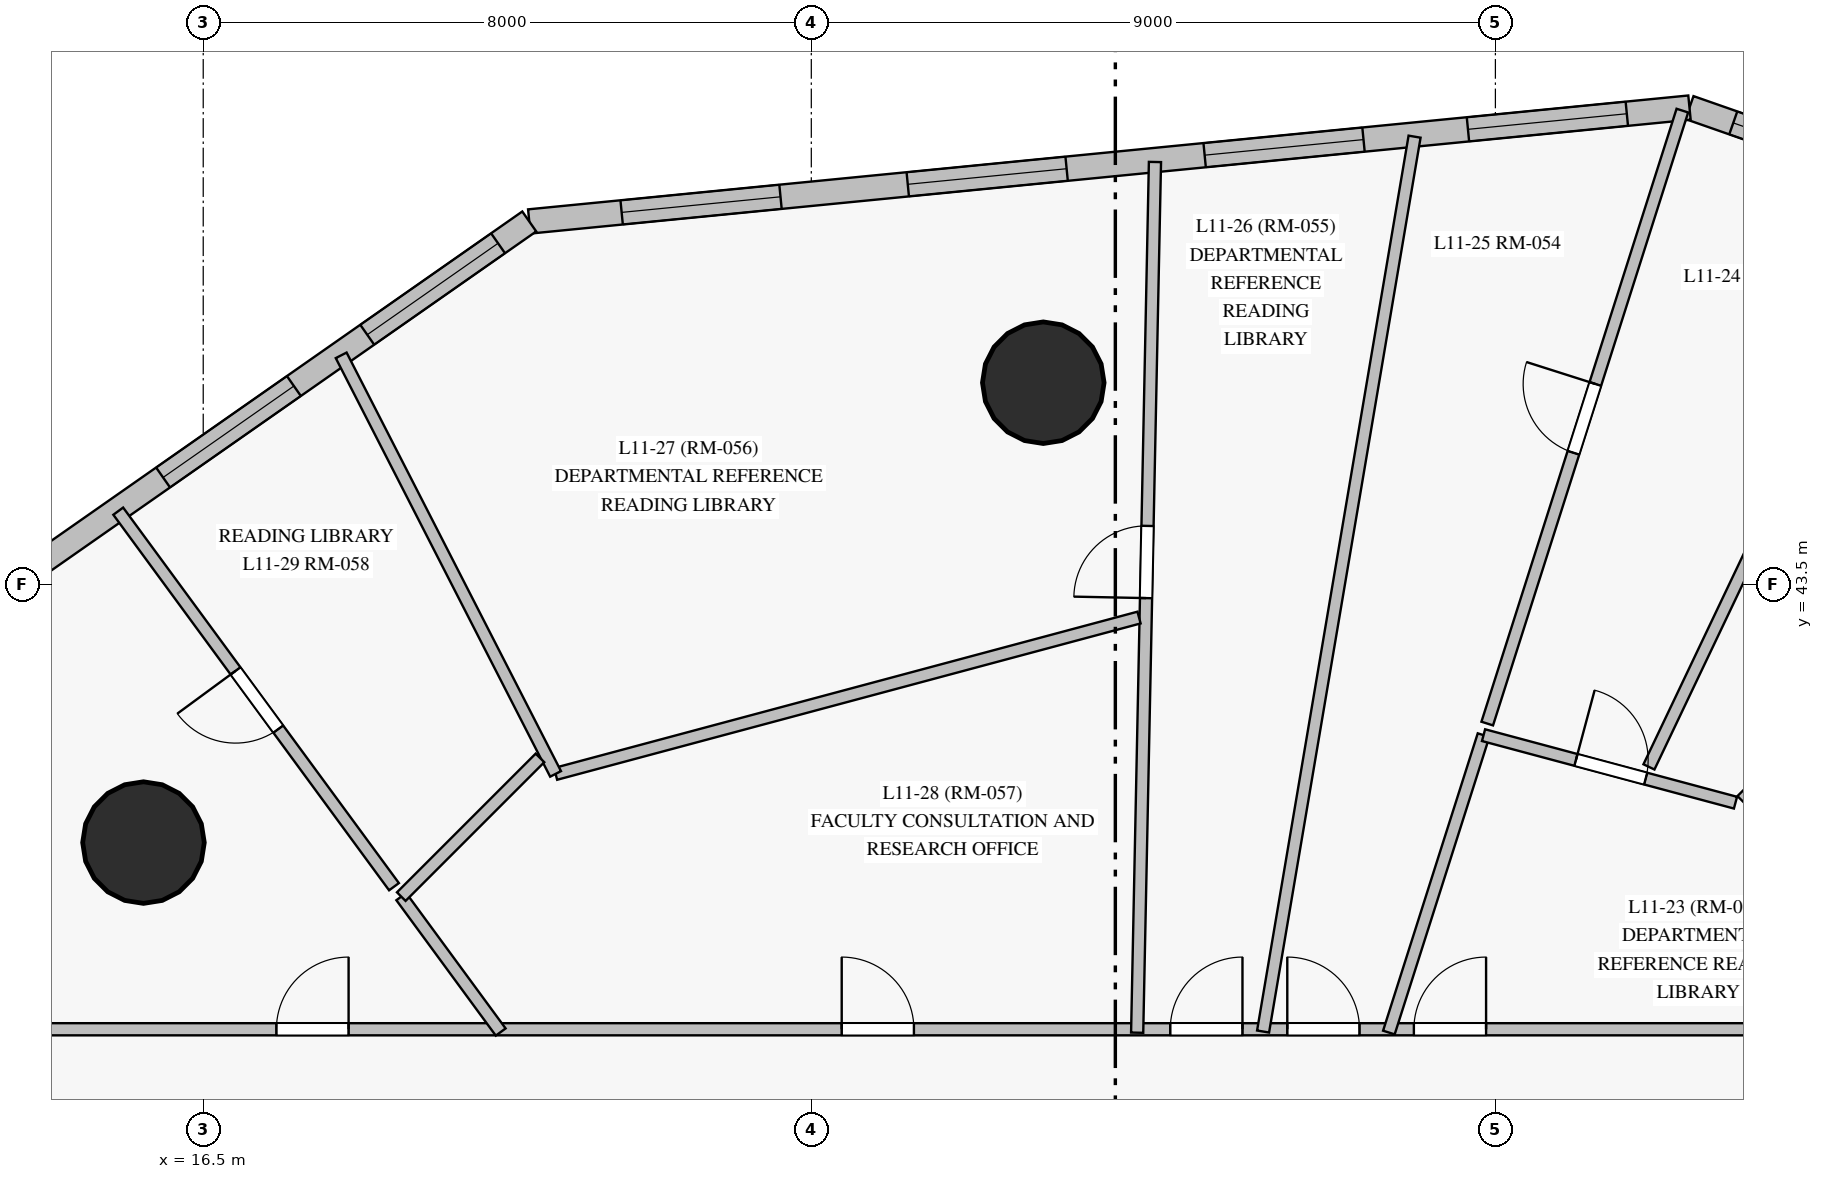
"""IFC4 building model, lengths in metres.
Left out: names, types, materials, properties, quantities, classifications, styles, units other than length and angle.
Written with IfcOpenShell. Run it as: python <this file> out.ifc"""

import sys

from ifc_helpers import new_model, si_unit, direction, frame, frame_2d, origin, origin_with_axes, origin_2d, place, context, subcontext, project, spatial, rectangle, circle, extrude, source, transform, mapped, element, fill, save


model = new_model("IFC4")
c1 = context("Model", 3, precision=1e-05, world=origin(), true_north=direction((0.0, 1.0)))
c2 = subcontext(c1, "Body", "Model", "MODEL_VIEW")
j1 = project(units=[si_unit("LENGTHUNIT", "METRE"), si_unit("PLANEANGLEUNIT", "RADIAN")], contexts=[c1])
p1 = place(None, origin())
s1 = spatial("IfcSite", under=j1, at=p1, CompositionType="ELEMENT")
p2 = place(p1, origin())
s2 = spatial("IfcBuilding", under=s1, at=p2, CompositionType="ELEMENT")
p3 = place(p2, frame((0.0, 0.0, 44.5)))
s3 = spatial("IfcBuildingStorey", under=s2, at=p3, CompositionType="ELEMENT", Elevation=44.5)
m1 = source(origin_with_axes(), c2, "Body", "SweptSolid", [
    extrude(circle(Radius=0.8, at=origin_2d()), origin(), (0.0, 0.0, 1.0), 3.6),
])
for number, where, z_axis, x_axis in (
    (1, (27.552, 46.156, 0.0), (0.0, 0.0, 1.0), (1.0, 0.0, 0.0)),
    (2, (15.714, 40.106, 0.0), (0.0, 0.0, 1.0), (1.0, 0.0, 0.0)),
):
    element("IfcColumn", number, at=place(p3, frame(where, z_axis=z_axis, x_axis=x_axis)), inside=s3, PredefinedType="COLUMN", context=c2, shape_type="MappedRepresentation", body=[
        mapped(m1, transform((0.0, 0.0, 0.0), scale=1.0)),
    ])
p4 = place(p3, frame((46.022, 46.29, 0.0), z_axis=(0.0, 0.0, 1.0), x_axis=(-0.943970038145, 0.330031160777, 0.0)))
e3 = element("IfcWall", 3, at=p4, inside=s3, PredefinedType="SOLIDWALL", context=c2, shape_type="SweptSolid", body=[
    extrude(rectangle(XDim=10.56, YDim=0.32, at=frame_2d((5.28, 0.0))), origin(), (0.0, 0.0, 1.0), 3.35),
])
p5 = place(p4, frame((0.576, 0.0, 0.85)))
e4 = element("IfcOpeningElement", 4, at=p5, cuts=e3, PredefinedType="OPENING", context=c2, shape_type="SweptSolid", body=[
    extrude(rectangle(XDim=1.5, YDim=1.85, at=frame_2d((0.75, 0.925))), frame((0.0, 0.17, 0.0), z_axis=(0.0, -1.0, 0.0), x_axis=(1.0, 0.0, 0.0)), (0.0, 0.0, 1.0), 0.34),
])
p6 = place(p4, frame((3.896, 0.0, 0.85)))
e5 = element("IfcOpeningElement", 5, at=p6, cuts=e3, PredefinedType="OPENING", context=c2, shape_type="SweptSolid", body=[
    extrude(rectangle(XDim=2.1, YDim=1.95, at=frame_2d((1.05, 0.975))), frame((0.0, 0.17, 0.0), z_axis=(0.0, -1.0, 0.0), x_axis=(1.0, 0.0, 0.0)), (0.0, 0.0, 1.0), 0.34),
])
p7 = place(p4, frame((7.85, 0.0, 0.85)))
e6 = element("IfcOpeningElement", 6, at=p7, cuts=e3, PredefinedType="OPENING", context=c2, shape_type="SweptSolid", body=[
    extrude(rectangle(XDim=2.1, YDim=1.95, at=frame_2d((1.05, 0.975))), frame((0.0, 0.17, 0.0), z_axis=(0.0, -1.0, 0.0), x_axis=(1.0, 0.0, 0.0)), (0.0, 0.0, 1.0), 0.34),
])
p8 = place(p3, frame((36.053, 49.775, 0.0), z_axis=(0.0, 0.0, 1.0), x_axis=(-0.995220186706, -0.097656438461, 0.0)))
e7 = element("IfcWall", 7, at=p8, inside=s3, PredefinedType="SOLIDWALL", context=c2, shape_type="SweptSolid", body=[
    extrude(rectangle(XDim=15.337, YDim=0.32, at=frame_2d((7.669, 0.0))), origin(), (0.0, 0.0, 1.0), 3.35),
])
p9 = place(p8, frame((0.828, 0.0, 0.85)))
e8 = element("IfcOpeningElement", 8, at=p9, cuts=e7, PredefinedType="OPENING", context=c2, shape_type="SweptSolid", body=[
    extrude(rectangle(XDim=2.1, YDim=1.95, at=frame_2d((1.05, 0.975))), frame((0.0, 0.17, 0.0), z_axis=(0.0, -1.0, 0.0), x_axis=(1.0, 0.0, 0.0)), (0.0, 0.0, 1.0), 0.34),
])
p10 = place(p8, frame((4.309, 0.0, 0.85)))
e9 = element("IfcOpeningElement", 9, at=p10, cuts=e7, PredefinedType="OPENING", context=c2, shape_type="SweptSolid", body=[
    extrude(rectangle(XDim=2.1, YDim=1.95, at=frame_2d((1.05, 0.975))), frame((0.0, 0.17, 0.0), z_axis=(0.0, -1.0, 0.0), x_axis=(1.0, 0.0, 0.0)), (0.0, 0.0, 1.0), 0.34),
])
p11 = place(p8, frame((8.234, 0.0, 0.85)))
e10 = element("IfcOpeningElement", 10, at=p11, cuts=e7, PredefinedType="OPENING", context=c2, shape_type="SweptSolid", body=[
    extrude(rectangle(XDim=2.1, YDim=1.95, at=frame_2d((1.05, 0.975))), frame((0.0, 0.17, 0.0), z_axis=(0.0, -1.0, 0.0), x_axis=(1.0, 0.0, 0.0)), (0.0, 0.0, 1.0), 0.34),
])
p12 = place(p8, frame((12.016, 0.0, 0.85)))
e11 = element("IfcOpeningElement", 11, at=p12, cuts=e7, PredefinedType="OPENING", context=c2, shape_type="SweptSolid", body=[
    extrude(rectangle(XDim=2.1, YDim=1.95, at=frame_2d((1.05, 0.975))), frame((0.0, 0.17, 0.0), z_axis=(0.0, -1.0, 0.0), x_axis=(1.0, 0.0, 0.0)), (0.0, 0.0, 1.0), 0.34),
])
p13 = place(p3, frame((20.789, 48.278, 0.0), z_axis=(0.0, 0.0, 1.0), x_axis=(-0.819542780698, -0.573018001991, 0.0)))
e12 = element("IfcWall", 12, at=p13, inside=s3, PredefinedType="SOLIDWALL", context=c2, shape_type="SweptSolid", body=[
    extrude(rectangle(XDim=12.319, YDim=0.32, at=frame_2d((6.159, 0.0))), origin(), (0.0, 0.0, 1.0), 3.35),
])
p14 = place(p13, frame((0.501, 0.0, 0.85)))
e13 = element("IfcOpeningElement", 13, at=p14, cuts=e12, PredefinedType="OPENING", context=c2, shape_type="SweptSolid", body=[
    extrude(rectangle(XDim=2.1, YDim=1.95, at=frame_2d((1.05, 0.975))), frame((0.0, 0.17, 0.0), z_axis=(0.0, -1.0, 0.0), x_axis=(1.0, 0.0, 0.0)), (0.0, 0.0, 1.0), 0.34),
])
p15 = place(p13, frame((3.778, 0.0, 0.85)))
e14 = element("IfcOpeningElement", 14, at=p15, cuts=e12, PredefinedType="OPENING", context=c2, shape_type="SweptSolid", body=[
    extrude(rectangle(XDim=2.1, YDim=1.95, at=frame_2d((1.05, 0.975))), frame((0.0, 0.17, 0.0), z_axis=(0.0, -1.0, 0.0), x_axis=(1.0, 0.0, 0.0)), (0.0, 0.0, 1.0), 0.34),
])
p16 = place(p13, frame((8.387, 0.0, 0.85)))
e15 = element("IfcOpeningElement", 15, at=p16, cuts=e12, PredefinedType="OPENING", context=c2, shape_type="SweptSolid", body=[
    extrude(rectangle(XDim=2.1, YDim=1.95, at=frame_2d((1.05, 0.975))), frame((0.0, 0.17, 0.0), z_axis=(0.0, -1.0, 0.0), x_axis=(1.0, 0.0, 0.0)), (0.0, 0.0, 1.0), 0.34),
])
p17 = place(p3, frame((10.5, 37.65, 0.0), z_axis=(0.0, 0.0, 1.0), x_axis=(1.0, 0.0, 0.0)))
e16 = element("IfcWall", 16, at=p17, inside=s3, PredefinedType="PARTITIONING", context=c2, shape_type="SweptSolid", body=[
    extrude(rectangle(XDim=29.75, YDim=0.16, at=frame_2d((14.875, 0.0))), origin(), (0.0, 0.0, 1.0), 2.75),
])
p18 = place(p17, frame((21.927, 0.0, 0.0)))
e17 = element("IfcOpeningElement", 17, at=p18, cuts=e16, PredefinedType="OPENING", context=c2, shape_type="SweptSolid", body=[
    extrude(rectangle(XDim=0.95, YDim=2.15, at=frame_2d((0.475, 1.075))), frame((0.0, 0.09, 0.0), z_axis=(0.0, -1.0, 0.0), x_axis=(1.0, 0.0, 0.0)), (0.0, 0.0, 1.0), 0.18),
])
p19 = place(p17, frame((20.262, 0.0, 0.0)))
e18 = element("IfcOpeningElement", 18, at=p19, cuts=e16, PredefinedType="OPENING", context=c2, shape_type="SweptSolid", body=[
    extrude(rectangle(XDim=0.95, YDim=2.15, at=frame_2d((0.475, 1.075))), frame((0.0, 0.09, 0.0), z_axis=(0.0, -1.0, 0.0), x_axis=(1.0, 0.0, 0.0)), (0.0, 0.0, 1.0), 0.18),
])
p20 = place(p17, frame((18.722, 0.0, 0.0)))
e19 = element("IfcOpeningElement", 19, at=p20, cuts=e16, PredefinedType="OPENING", context=c2, shape_type="SweptSolid", body=[
    extrude(rectangle(XDim=0.95, YDim=2.15, at=frame_2d((0.475, 1.075))), frame((0.0, 0.09, 0.0), z_axis=(0.0, -1.0, 0.0), x_axis=(1.0, 0.0, 0.0)), (0.0, 0.0, 1.0), 0.18),
])
p21 = place(p17, frame((14.4, 0.0, 0.0)))
e20 = element("IfcOpeningElement", 20, at=p21, cuts=e16, PredefinedType="OPENING", context=c2, shape_type="SweptSolid", body=[
    extrude(rectangle(XDim=0.95, YDim=2.15, at=frame_2d((0.475, 1.075))), frame((0.0, 0.09, 0.0), z_axis=(0.0, -1.0, 0.0), x_axis=(1.0, 0.0, 0.0)), (0.0, 0.0, 1.0), 0.18),
])
p22 = place(p17, frame((6.962, 0.0, 0.0)))
e21 = element("IfcOpeningElement", 21, at=p22, cuts=e16, PredefinedType="OPENING", context=c2, shape_type="SweptSolid", body=[
    extrude(rectangle(XDim=0.95, YDim=2.15, at=frame_2d((0.475, 1.075))), frame((0.0, 0.09, 0.0), z_axis=(0.0, -1.0, 0.0), x_axis=(1.0, 0.0, 0.0)), (0.0, 0.0, 1.0), 0.18),
])
p23 = place(p3, frame((30.444, 37.62, 0.0), z_axis=(0.0, 0.0, 1.0), x_axis=(0.166928333603, 0.985969031684, 0.0)))
e22 = element("IfcWall", 22, at=p23, inside=s3, PredefinedType="PARTITIONING", context=c2, shape_type="SweptSolid", body=[
    extrude(rectangle(XDim=11.94, YDim=0.16, at=frame_2d((5.97, 0.0))), origin(), (0.0, 0.0, 1.0), 3.35),
])
p24 = place(p3, frame((28.787, 37.605, 0.0), z_axis=(0.0, 0.0, 1.0), x_axis=(0.020435212619, 0.99979117924, 0.0)))
e23 = element("IfcWall", 23, at=p24, inside=s3, PredefinedType="PARTITIONING", context=c2, shape_type="SweptSolid", body=[
    extrude(rectangle(XDim=11.457, YDim=0.16, at=frame_2d((5.729, 0.0))), origin(), (0.0, 0.0, 1.0), 3.35),
])
p25 = place(p24, frame((5.719, 0.0, 0.0)))
e24 = element("IfcOpeningElement", 24, at=p25, cuts=e23, PredefinedType="OPENING", context=c2, shape_type="SweptSolid", body=[
    extrude(rectangle(XDim=0.95, YDim=2.15, at=frame_2d((0.475, 1.075))), frame((0.0, 0.09, 0.0), z_axis=(0.0, -1.0, 0.0), x_axis=(1.0, 0.0, 0.0)), (0.0, 0.0, 1.0), 0.18),
])
p26 = place(p3, frame((33.393, 41.672, 0.0), z_axis=(0.0, 0.0, 1.0), x_axis=(0.303320350776, 0.952888642395, 0.0)))
e25 = element("IfcWall", 25, at=p26, inside=s3, PredefinedType="PARTITIONING", context=c2, shape_type="SweptSolid", body=[
    extrude(rectangle(XDim=8.463, YDim=0.16, at=frame_2d((4.231, 0.0))), origin(), (0.0, 0.0, 1.0), 3.35),
])
p27 = place(p26, frame((3.739, 0.0, 0.0)))
e26 = element("IfcOpeningElement", 26, at=p27, cuts=e25, PredefinedType="OPENING", context=c2, shape_type="SweptSolid", body=[
    extrude(rectangle(XDim=0.95, YDim=2.15, at=frame_2d((0.475, 1.075))), frame((0.0, 0.09, 0.0), z_axis=(0.0, -1.0, 0.0), x_axis=(1.0, 0.0, 0.0)), (0.0, 0.0, 1.0), 0.18),
])
p28 = place(p3, frame((35.52, 41.102, 0.0), z_axis=(0.0, 0.0, 1.0), x_axis=(0.429957308005, 0.902849219578, 0.0)))
e27 = element("IfcWall", 27, at=p28, inside=s3, PredefinedType="PARTITIONING", context=c2, shape_type="SweptSolid", body=[
    extrude(rectangle(XDim=8.387, YDim=0.16, at=frame_2d((4.194, 0.0))), origin(), (0.0, 0.0, 1.0), 3.35),
])
p29 = place(p3, frame((28.812, 43.066, 0.0), z_axis=(0.0, 0.0, 1.0), x_axis=(-0.965922681533, -0.258830781207, 0.0)))
e28 = element("IfcWall", 28, at=p29, inside=s3, PredefinedType="PARTITIONING", context=c2, shape_type="SweptSolid", body=[
    extrude(rectangle(XDim=7.947, YDim=0.16, at=frame_2d((3.973, 0.0))), origin(), (0.0, 0.0, 1.0), 2.75),
])
p30 = place(p3, frame((21.136, 41.01, 0.0), z_axis=(0.0, 0.0, 1.0), x_axis=(-0.455904840593, 0.890028525568, 0.0)))
e29 = element("IfcWall", 29, at=p30, inside=s3, PredefinedType="PARTITIONING", context=c2, shape_type="SweptSolid", body=[
    extrude(rectangle(XDim=6.187, YDim=0.16, at=frame_2d((3.094, 0.0))), origin(), (0.0, 0.0, 1.0), 3.35),
])
p31 = place(p3, frame((19.01, 39.526, 0.0), z_axis=(0.0, 0.0, 1.0), x_axis=(-0.591869476639, 0.806033822257, 0.0)))
e30 = element("IfcWall", 30, at=p31, inside=s3, PredefinedType="PARTITIONING", context=c2, shape_type="SweptSolid", body=[
    extrude(rectangle(XDim=6.13, YDim=0.16, at=frame_2d((3.065, 0.0))), origin(), (0.0, 0.0, 1.0), 3.35),
])
p32 = place(p31, frame((2.572, 0.0, 0.0)))
e31 = element("IfcOpeningElement", 31, at=p32, cuts=e30, PredefinedType="OPENING", context=c2, shape_type="SweptSolid", body=[
    extrude(rectangle(XDim=0.95, YDim=2.15, at=frame_2d((0.475, 1.075))), frame((0.0, 0.09, 0.0), z_axis=(0.0, -1.0, 0.0), x_axis=(1.0, 0.0, 0.0)), (0.0, 0.0, 1.0), 0.18),
])
p33 = place(p3, frame((32.099, 37.607, 0.0), z_axis=(0.0, 0.0, 1.0), x_axis=(0.303390190683, 0.952866408369, 0.0)))
e32 = element("IfcWall", 32, at=p33, inside=s3, PredefinedType="PARTITIONING", context=c2, shape_type="SweptSolid", body=[
    extrude(rectangle(XDim=4.106, YDim=0.16, at=frame_2d((2.053, 0.0))), origin(), (0.0, 0.0, 1.0), 3.35),
])
p34 = place(p3, frame((33.344, 41.519, 0.0), z_axis=(0.0, 0.0, 1.0), x_axis=(0.965920102757, -0.258840404672, 0.0)))
e33 = element("IfcWall", 33, at=p34, inside=s3, PredefinedType="PARTITIONING", context=c2, shape_type="SweptSolid", body=[
    extrude(rectangle(XDim=3.431, YDim=0.16, at=frame_2d((1.716, 0.0))), origin(), (0.0, 0.0, 1.0), 3.35),
])
p35 = place(p34, frame((1.259, 0.0, 0.0)))
e34 = element("IfcOpeningElement", 34, at=p35, cuts=e33, PredefinedType="OPENING", context=c2, shape_type="SweptSolid", body=[
    extrude(rectangle(XDim=0.95, YDim=2.15, at=frame_2d((0.475, 1.075))), frame((0.0, 0.09, 0.0), z_axis=(0.0, -1.0, 0.0), x_axis=(1.0, 0.0, 0.0)), (0.0, 0.0, 1.0), 0.18),
])
p36 = place(p3, frame((20.414, 37.614, 0.0), z_axis=(0.0, 0.0, 1.0), x_axis=(-0.591928563028, 0.805990431874, 0.0)))
e35 = element("IfcWall", 35, at=p36, inside=s3, PredefinedType="PARTITIONING", context=c2, shape_type="SweptSolid", body=[
    extrude(rectangle(XDim=2.21, YDim=0.16, at=frame_2d((1.105, 0.0))), origin(), (0.0, 0.0, 1.0), 3.35),
])
p37 = place(p3, frame((19.105, 39.395, 0.0), z_axis=(0.0, 0.0, 1.0), x_axis=(0.707154080881, 0.707059478328, 0.0)))
e36 = element("IfcWall", 36, at=p37, inside=s3, PredefinedType="PARTITIONING", context=c2, shape_type="SweptSolid", body=[
    extrude(rectangle(XDim=2.581, YDim=0.16, at=frame_2d((1.291, 0.0))), origin(), (0.0, 0.0, 1.0), 2.75),
])
p38 = place(p3, frame((37.94, 39.576, 0.0), z_axis=(0.0, 0.0, 1.0), x_axis=(-0.707106781187, 0.707106781187, 0.0)))
e37 = element("IfcWall", 37, at=p38, inside=s3, PredefinedType="PARTITIONING", context=c2, shape_type="SweptSolid", body=[
    extrude(rectangle(XDim=1.695, YDim=0.16, at=frame_2d((0.847, 0.0))), origin(), (0.0, 0.0, 1.0), 2.75),
])
m2 = source(origin_with_axes(), c2, "Body", "SweptSolid", [
    extrude(rectangle(XDim=2.1, YDim=1.95, at=frame_2d((1.05, 0.975))), frame((0.0, 0.03, 0.0), z_axis=(0.0, -1.0, 0.0), x_axis=(1.0, 0.0, 0.0)), (0.0, 0.0, 1.0), 0.06),
])
p39 = place(p7, origin())
e38 = element("IfcWindow", 38, at=p39, inside=s3, PartitioningType="SINGLE_PANEL", PredefinedType="WINDOW", context=c2, shape_type="MappedRepresentation", body=[
    mapped(m2, transform((0.0, 0.0, 0.0), scale=1.0)),
])
fill(e6, e38)
p40 = place(p9, origin())
e39 = element("IfcWindow", 39, at=p40, inside=s3, PartitioningType="SINGLE_PANEL", PredefinedType="WINDOW", context=c2, shape_type="MappedRepresentation", body=[
    mapped(m2, transform((0.0, 0.0, 0.0), scale=1.0)),
])
fill(e8, e39)
p41 = place(p10, origin())
e40 = element("IfcWindow", 40, at=p41, inside=s3, PartitioningType="SINGLE_PANEL", PredefinedType="WINDOW", context=c2, shape_type="MappedRepresentation", body=[
    mapped(m2, transform((0.0, 0.0, 0.0), scale=1.0)),
])
fill(e9, e40)
p42 = place(p11, origin())
e41 = element("IfcWindow", 41, at=p42, inside=s3, PartitioningType="SINGLE_PANEL", PredefinedType="WINDOW", context=c2, shape_type="MappedRepresentation", body=[
    mapped(m2, transform((0.0, 0.0, 0.0), scale=1.0)),
])
fill(e10, e41)
p43 = place(p12, origin())
e42 = element("IfcWindow", 42, at=p43, inside=s3, PartitioningType="SINGLE_PANEL", PredefinedType="WINDOW", context=c2, shape_type="MappedRepresentation", body=[
    mapped(m2, transform((0.0, 0.0, 0.0), scale=1.0)),
])
fill(e11, e42)
p44 = place(p14, origin())
e43 = element("IfcWindow", 43, at=p44, inside=s3, PartitioningType="SINGLE_PANEL", PredefinedType="WINDOW", context=c2, shape_type="MappedRepresentation", body=[
    mapped(m2, transform((0.0, 0.0, 0.0), scale=1.0)),
])
fill(e13, e43)
p45 = place(p15, origin())
e44 = element("IfcWindow", 44, at=p45, inside=s3, PartitioningType="SINGLE_PANEL", PredefinedType="WINDOW", context=c2, shape_type="MappedRepresentation", body=[
    mapped(m2, transform((0.0, 0.0, 0.0), scale=1.0)),
])
fill(e14, e44)
m3 = source(origin_with_axes(), c2, "Body", "SweptSolid", [
    extrude(rectangle(XDim=0.95, YDim=2.15, at=frame_2d((0.475, 1.075))), frame((0.0, 0.025, 0.0), z_axis=(0.0, -1.0, 0.0), x_axis=(1.0, 0.0, 0.0)), (0.0, 0.0, 1.0), 0.05),
])
p46 = place(p18, origin())
e45 = element("IfcDoor", 45, at=p46, inside=s3, OperationType="SINGLE_SWING_RIGHT", PredefinedType="DOOR", context=c2, shape_type="MappedRepresentation", body=[
    mapped(m3, transform((0.0, 0.0, 0.0), scale=1.0)),
])
fill(e17, e45)
p47 = place(p19, origin())
e46 = element("IfcDoor", 46, at=p47, inside=s3, OperationType="SINGLE_SWING_LEFT", PredefinedType="DOOR", context=c2, shape_type="MappedRepresentation", body=[
    mapped(m3, transform((0.0, 0.0, 0.0), scale=1.0)),
])
fill(e18, e46)
p48 = place(p20, origin())
e47 = element("IfcDoor", 47, at=p48, inside=s3, OperationType="SINGLE_SWING_RIGHT", PredefinedType="DOOR", context=c2, shape_type="MappedRepresentation", body=[
    mapped(m3, transform((0.0, 0.0, 0.0), scale=1.0)),
])
fill(e19, e47)
p49 = place(p21, origin())
e48 = element("IfcDoor", 48, at=p49, inside=s3, OperationType="SINGLE_SWING_LEFT", PredefinedType="DOOR", context=c2, shape_type="MappedRepresentation", body=[
    mapped(m3, transform((0.0, 0.0, 0.0), scale=1.0)),
])
fill(e20, e48)
p50 = place(p22, origin())
e49 = element("IfcDoor", 49, at=p50, inside=s3, OperationType="SINGLE_SWING_RIGHT", PredefinedType="DOOR", context=c2, shape_type="MappedRepresentation", body=[
    mapped(m3, transform((0.0, 0.0, 0.0), scale=1.0)),
])
fill(e21, e49)
p51 = place(p35, origin())
e50 = element("IfcDoor", 50, at=p51, inside=s3, OperationType="SINGLE_SWING_LEFT", PredefinedType="DOOR", context=c2, shape_type="MappedRepresentation", body=[
    mapped(m3, transform((0.0, 0.0, 0.0), scale=1.0)),
])
fill(e34, e50)
p52 = place(p27, origin())
e51 = element("IfcDoor", 51, at=p52, inside=s3, OperationType="SINGLE_SWING_RIGHT", PredefinedType="DOOR", context=c2, shape_type="MappedRepresentation", body=[
    mapped(m3, transform((0.0, 0.0, 0.0), scale=1.0)),
])
fill(e26, e51)
p53 = place(p25, origin())
e52 = element("IfcDoor", 52, at=p53, inside=s3, OperationType="SINGLE_SWING_LEFT", PredefinedType="DOOR", context=c2, shape_type="MappedRepresentation", body=[
    mapped(m3, transform((0.0, 0.0, 0.0), scale=1.0)),
])
fill(e24, e52)
p54 = place(p32, origin())
e53 = element("IfcDoor", 53, at=p54, inside=s3, OperationType="SINGLE_SWING_RIGHT", PredefinedType="DOOR", context=c2, shape_type="MappedRepresentation", body=[
    mapped(m3, transform((0.0, 0.0, 0.0), scale=1.0)),
])
fill(e31, e53)
save(model, sys.argv[1])
